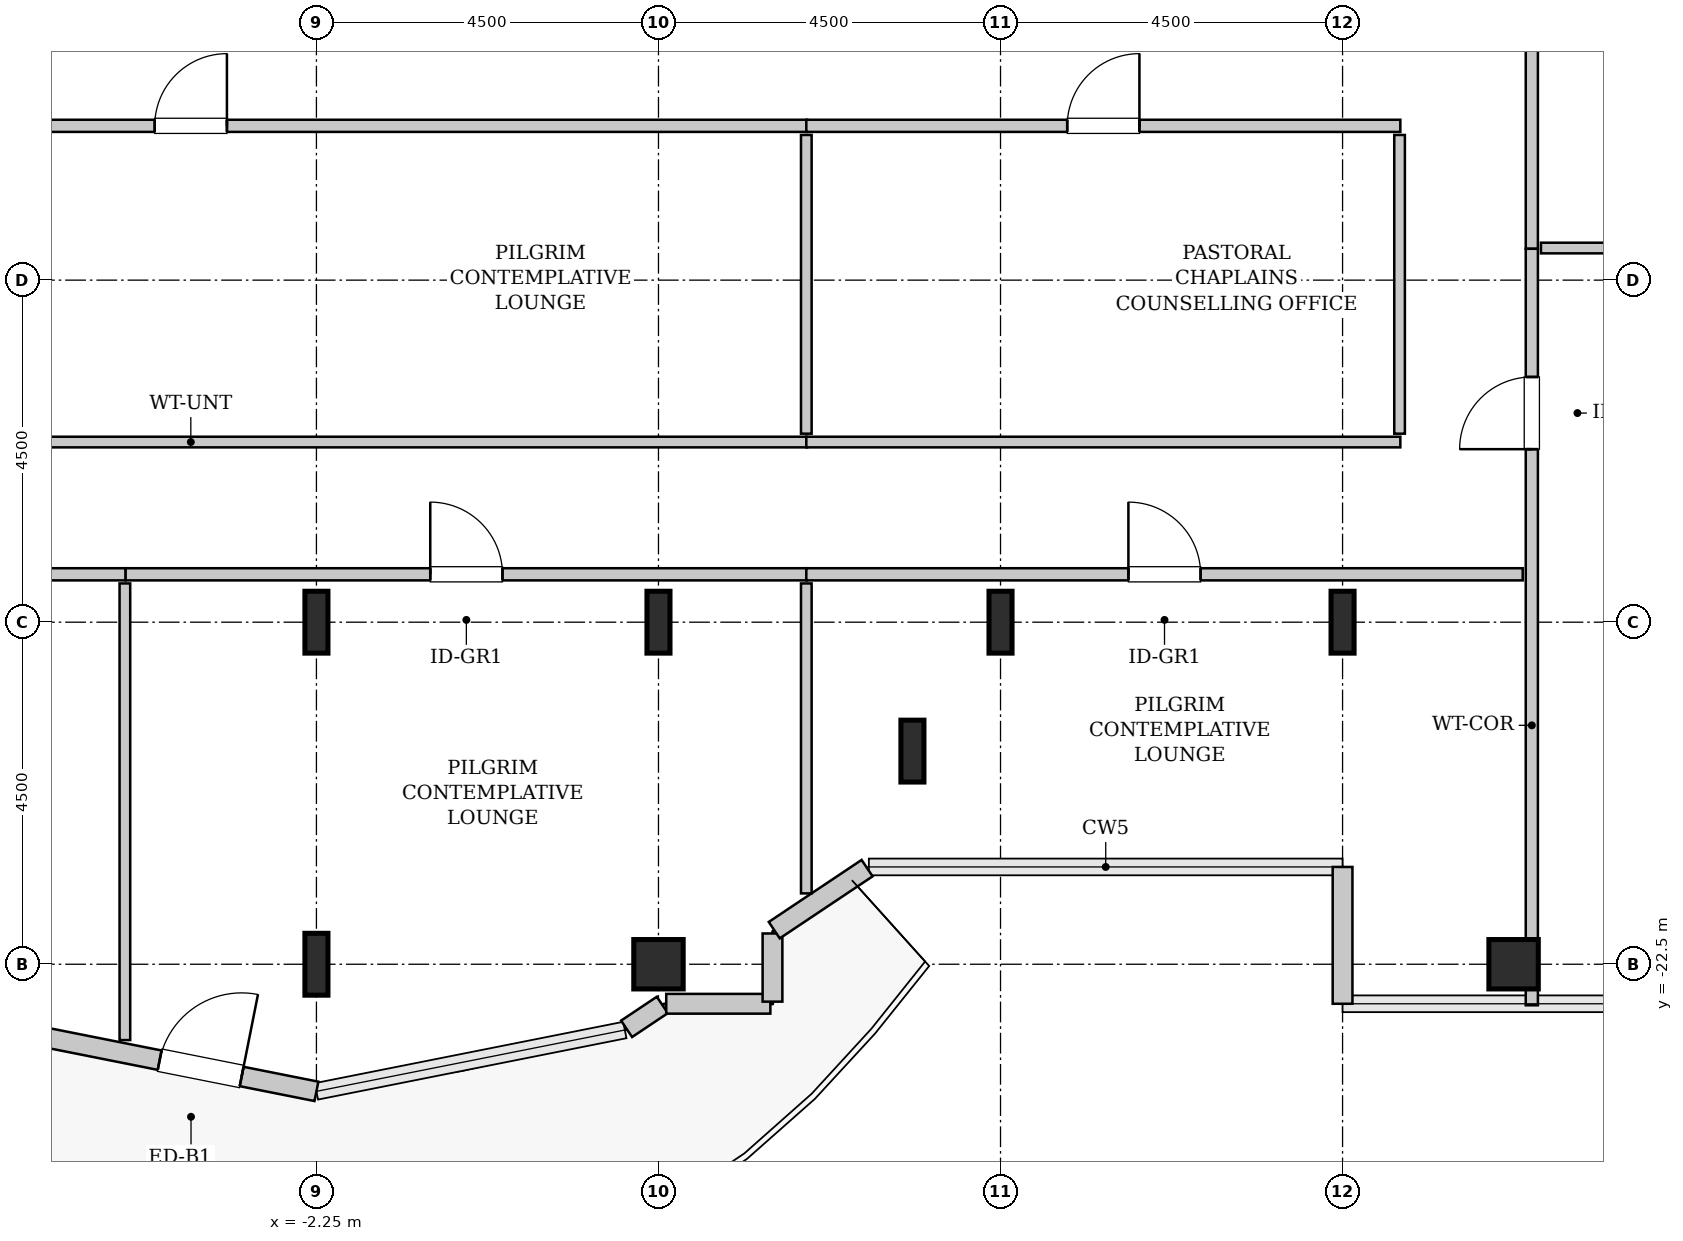
"""IFC4 building model, lengths in metres.
Left out: names, types, materials, properties, quantities, classifications, styles, units other than length and angle.
Written with IfcOpenShell. Run it as: python <this file> out.ifc"""

import sys

from ifc_helpers import new_model, si_unit, direction, frame, frame_2d, origin, origin_2d, place, context, subcontext, project, spatial, rectangle, hollow_rectangle, i_section, extrude, source, transform, mapped, element, fill, save


model = new_model("IFC4")
c1 = context("Model", 3, precision=1e-05, world=origin(), true_north=direction((0.0, 1.0)))
c2 = subcontext(c1, "Body", "Model", "MODEL_VIEW")
j1 = project(units=[si_unit("LENGTHUNIT", "METRE"), si_unit("PLANEANGLEUNIT", "RADIAN")], contexts=[c1])
p1 = place(None, origin())
s1 = spatial("IfcSite", under=j1, at=p1, CompositionType="ELEMENT")
p2 = place(p1, origin())
s2 = spatial("IfcBuilding", under=s1, at=p2, CompositionType="ELEMENT")
p3 = place(p2, frame((0.0, 0.0, 218.0)))
s3 = spatial("IfcBuildingStorey", under=s2, at=p3, CompositionType="ELEMENT", Elevation=218.0)
m1 = source(origin(), c2, "Body", "SweptSolid", [
    extrude(i_section(OverallWidth=0.303, OverallDepth=0.814, WebThickness=0.021, FlangeThickness=0.04, FilletRadius=0.03, at=origin_2d()), origin(), (0.0, 0.0, 1.0), 3.8),
])
for number, where, z_axis, x_axis in (
    (1, (-2.25, -22.5, 0.0), (0.0, 0.0, 1.0), (1.0, 0.0, 0.0)),
    (2, (-2.25, -18.0, 0.0), (0.0, 0.0, 1.0), (1.0, 0.0, 0.0)),
):
    element("IfcColumn", number, at=place(p3, frame(where, z_axis=z_axis, x_axis=x_axis)), inside=s3, PredefinedType="COLUMN", context=c2, shape_type="MappedRepresentation", body=[
        mapped(m1, transform((0.0, 0.0, 0.0), x_axis=(1.0, 0.0, 0.0), y_axis=(0.0, 1.0, 0.0), z_axis=(0.0, 0.0, 1.0), scale=1.0)),
    ])
m2 = source(origin(), c2, "Body", "SweptSolid", [
    extrude(hollow_rectangle(XDim=0.65, YDim=0.65, WallThickness=0.032, InnerFilletRadius=0.032, OuterFilletRadius=0.064, at=origin_2d()), origin(), (0.0, 0.0, 1.0), 3.8),
])
p4 = place(p3, frame((2.25, -22.5, 0.0), z_axis=(0.0, 0.0, 1.0), x_axis=(1.0, 0.0, 0.0)))
e3 = element("IfcColumn", 3, at=p4, inside=s3, PredefinedType="COLUMN", context=c2, shape_type="MappedRepresentation", body=[
    mapped(m2, transform((0.0, 0.0, 0.0), x_axis=(1.0, 0.0, 0.0), y_axis=(0.0, 1.0, 0.0), z_axis=(0.0, 0.0, 1.0), scale=1.0)),
])
for number, where, z_axis, x_axis in (
    (4, (2.25, -18.0, 0.0), (0.0, 0.0, 1.0), (1.0, 0.0, 0.0)),
    (5, (5.591, -19.696, 0.0), (0.0, 0.0, 1.0), (1.0, 0.0, 0.0)),
    (6, (6.75, -18.0, 0.0), (0.0, 0.0, 1.0), (1.0, 0.0, 0.0)),
    (7, (11.25, -18.0, 0.0), (0.0, 0.0, 1.0), (1.0, 0.0, 0.0)),
):
    element("IfcColumn", number, at=place(p3, frame(where, z_axis=z_axis, x_axis=x_axis)), inside=s3, PredefinedType="COLUMN", context=c2, shape_type="MappedRepresentation", body=[
        mapped(m1, transform((0.0, 0.0, 0.0), x_axis=(1.0, 0.0, 0.0), y_axis=(0.0, 1.0, 0.0), z_axis=(0.0, 0.0, 1.0), scale=1.0)),
    ])
p5 = place(p3, frame((13.5, -22.5, 0.0), z_axis=(0.0, 0.0, 1.0), x_axis=(1.0, 0.0, 0.0)))
e8 = element("IfcColumn", 8, at=p5, inside=s3, PredefinedType="COLUMN", context=c2, shape_type="MappedRepresentation", body=[
    mapped(m2, transform((0.0, 0.0, 0.0), x_axis=(1.0, 0.0, 0.0), y_axis=(0.0, 1.0, 0.0), z_axis=(0.0, 0.0, 1.0), scale=1.0)),
])
m3 = source(origin(), c2, "Body", "SweptSolid", [
    extrude(rectangle(XDim=1.8, YDim=0.26, at=frame_2d((0.9, 0.0))), origin(), (0.0, 0.0, 1.0), 3.55),
])
p6 = place(p3, frame((11.25, -21.22, 0.0), z_axis=(0.0, 0.0, 1.0), x_axis=(0.0, -1.0, 0.0)))
e9 = element("IfcWall", 9, at=p6, inside=s3, PredefinedType="SOLIDWALL", context=c2, shape_type="MappedRepresentation", body=[
    mapped(m3, transform((0.0, 0.0, 0.0), x_axis=(1.0, 0.0, 0.0), y_axis=(0.0, 1.0, 0.0), z_axis=(0.0, 0.0, 1.0), scale=1.0)),
])
m4 = source(origin(), c2, "Body", "SweptSolid", [
    extrude(rectangle(XDim=4.137, YDim=0.26, at=frame_2d((2.068, 0.0))), origin(), (0.0, 0.0, 1.0), 3.55),
])
p7 = place(p3, frame((-6.307, -23.365, 0.0), z_axis=(0.0, 0.0, 1.0), x_axis=(0.980782170794, -0.195105954428, 0.0)))
e10 = element("IfcWall", 10, at=p7, inside=s3, PredefinedType="SOLIDWALL", context=c2, shape_type="MappedRepresentation", body=[
    mapped(m4, transform((0.0, 0.0, 0.0), x_axis=(1.0, 0.0, 0.0), y_axis=(0.0, 1.0, 0.0), z_axis=(0.0, 0.0, 1.0), scale=1.0)),
])
p8 = place(p7, frame((2.034, 0.0, 0.0)))
e11 = element("IfcOpeningElement", 11, at=p8, cuts=e10, PredefinedType="OPENING", context=c2, shape_type="SweptSolid", body=[
    extrude(rectangle(XDim=1.1, YDim=2.2, at=frame_2d((0.55, 1.1))), frame((0.0, 0.14, 0.0), z_axis=(0.0, -1.0, 0.0), x_axis=(1.0, 0.0, 0.0)), (0.0, 0.0, 1.0), 0.28),
])
m5 = source(origin(), c2, "Body", "SweptSolid", [
    extrude(rectangle(XDim=0.565, YDim=0.26, at=frame_2d((0.283, 0.0))), origin(), (0.0, 0.0, 1.0), 3.55),
])
p9 = place(p3, frame((1.831, -23.35, 0.0), z_axis=(0.0, 0.0, 1.0), x_axis=(0.831651492666, 0.555297933317, 0.0)))
e12 = element("IfcWall", 12, at=p9, inside=s3, PredefinedType="SOLIDWALL", context=c2, shape_type="MappedRepresentation", body=[
    mapped(m5, transform((0.0, 0.0, 0.0), x_axis=(1.0, 0.0, 0.0), y_axis=(0.0, 1.0, 0.0), z_axis=(0.0, 0.0, 1.0), scale=1.0)),
])
m6 = source(origin(), c2, "Body", "SweptSolid", [
    extrude(rectangle(XDim=1.37, YDim=0.26, at=frame_2d((0.685, 0.0))), origin(), (0.0, 0.0, 1.0), 3.55),
])
p10 = place(p3, frame((2.352, -23.02, 0.0), z_axis=(0.0, 0.0, 1.0), x_axis=(1.0, 0.0, 0.0)))
e13 = element("IfcWall", 13, at=p10, inside=s3, PredefinedType="SOLIDWALL", context=c2, shape_type="MappedRepresentation", body=[
    mapped(m6, transform((0.0, 0.0, 0.0), x_axis=(1.0, 0.0, 0.0), y_axis=(0.0, 1.0, 0.0), z_axis=(0.0, 0.0, 1.0), scale=1.0)),
])
m7 = source(origin(), c2, "Body", "SweptSolid", [
    extrude(rectangle(XDim=0.897, YDim=0.26, at=frame_2d((0.448, 0.0))), origin(), (0.0, 0.0, 1.0), 3.55),
])
p11 = place(p3, frame((3.75, -22.992, 0.0), z_axis=(0.0, 0.0, 1.0), x_axis=(0.0, 1.0, 0.0)))
e14 = element("IfcWall", 14, at=p11, inside=s3, PredefinedType="SOLIDWALL", context=c2, shape_type="MappedRepresentation", body=[
    mapped(m7, transform((0.0, 0.0, 0.0), x_axis=(1.0, 0.0, 0.0), y_axis=(0.0, 1.0, 0.0), z_axis=(0.0, 0.0, 1.0), scale=1.0)),
])
m8 = source(origin(), c2, "Body", "SweptSolid", [
    extrude(rectangle(XDim=1.469, YDim=0.26, at=frame_2d((0.734, 0.0))), origin(), (0.0, 0.0, 1.0), 3.55),
])
p12 = place(p3, frame((3.773, -22.052, 0.0), z_axis=(0.0, 0.0, 1.0), x_axis=(0.831461760506, 0.555581983884, 0.0)))
e15 = element("IfcWall", 15, at=p12, inside=s3, PredefinedType="SOLIDWALL", context=c2, shape_type="MappedRepresentation", body=[
    mapped(m8, transform((0.0, 0.0, 0.0), x_axis=(1.0, 0.0, 0.0), y_axis=(0.0, 1.0, 0.0), z_axis=(0.0, 0.0, 1.0), scale=1.0)),
])
m9 = source(origin(), c2, "Body", "SweptSolid", [
    extrude(rectangle(XDim=9.892, YDim=0.16, at=frame_2d((4.946, 0.0))), origin(), (0.0, 0.0, 1.0), 3.535),
])
p13 = place(p3, frame((13.74, -13.087, 0.0), z_axis=(0.0, 0.0, 1.0), x_axis=(0.0, 1.0, 0.0)))
e16 = element("IfcWall", 16, at=p13, inside=s3, PredefinedType="PARTITIONING", context=c2, shape_type="MappedRepresentation", body=[
    mapped(m9, transform((0.0, 0.0, 0.0), x_axis=(1.0, 0.0, 0.0), y_axis=(0.0, 1.0, 0.0), z_axis=(0.0, 0.0, 1.0), scale=1.0)),
])
p14 = place(p13, frame((4.471, 0.0, 0.0)))
e17 = element("IfcOpeningElement", 17, at=p14, cuts=e16, PredefinedType="OPENING", context=c2, shape_type="SweptSolid", body=[
    extrude(rectangle(XDim=0.95, YDim=2.1, at=frame_2d((0.475, 1.05))), frame((0.0, 0.09, 0.0), z_axis=(0.0, -1.0, 0.0), x_axis=(1.0, 0.0, 0.0)), (0.0, 0.0, 1.0), 0.18),
])
m10 = source(origin(), c2, "Body", "SweptSolid", [
    extrude(rectangle(XDim=11.43, YDim=0.14, at=frame_2d((5.715, 0.0))), origin(), (0.0, 0.0, 1.0), 2.925),
])
p15 = place(p3, frame((13.86, -13.077, 0.0), z_axis=(0.0, 0.0, 1.0), x_axis=(1.0, 0.0, 0.0)))
e18 = element("IfcWall", 18, at=p15, inside=s3, PredefinedType="PARTITIONING", context=c2, shape_type="MappedRepresentation", body=[
    mapped(m10, transform((0.0, 0.0, 0.0), x_axis=(1.0, 0.0, 0.0), y_axis=(0.0, 1.0, 0.0), z_axis=(0.0, 0.0, 1.0), scale=1.0)),
])
m11 = source(origin(), c2, "Body", "SweptSolid", [
    extrude(rectangle(XDim=9.953, YDim=0.16, at=frame_2d((4.976, 0.0))), origin(), (0.0, 0.0, 1.0), 3.535),
])
p16 = place(p3, frame((13.74, -23.04, 0.0), z_axis=(0.0, 0.0, 1.0), x_axis=(0.0, 1.0, 0.0)))
e19 = element("IfcWall", 19, at=p16, inside=s3, PredefinedType="PARTITIONING", context=c2, shape_type="MappedRepresentation", body=[
    mapped(m11, transform((0.0, 0.0, 0.0), x_axis=(1.0, 0.0, 0.0), y_axis=(0.0, 1.0, 0.0), z_axis=(0.0, 0.0, 1.0), scale=1.0)),
])
p17 = place(p16, frame((7.316, 0.0, 0.0)))
e20 = element("IfcOpeningElement", 20, at=p17, cuts=e19, PredefinedType="OPENING", context=c2, shape_type="SweptSolid", body=[
    extrude(rectangle(XDim=0.95, YDim=2.1, at=frame_2d((0.475, 1.05))), frame((0.0, 0.09, 0.0), z_axis=(0.0, -1.0, 0.0), x_axis=(1.0, 0.0, 0.0)), (0.0, 0.0, 1.0), 0.18),
])
m12 = source(origin(), c2, "Body", "SweptSolid", [
    extrude(rectangle(XDim=8.86, YDim=0.16, at=frame_2d((4.43, 0.0))), origin(), (0.0, 0.0, 1.0), 3.535),
])
p18 = place(p3, frame((-13.62, -17.37, 0.0), z_axis=(0.0, 0.0, 1.0), x_axis=(1.0, 0.0, 0.0)))
e21 = element("IfcWall", 21, at=p18, inside=s3, PredefinedType="PARTITIONING", context=c2, shape_type="MappedRepresentation", body=[
    mapped(m12, transform((0.0, 0.0, 0.0), x_axis=(1.0, 0.0, 0.0), y_axis=(0.0, 1.0, 0.0), z_axis=(0.0, 0.0, 1.0), scale=1.0)),
])
p19 = place(p18, frame((3.955, 0.0, 0.0)))
e22 = element("IfcOpeningElement", 22, at=p19, cuts=e21, PredefinedType="OPENING", context=c2, shape_type="SweptSolid", body=[
    extrude(rectangle(XDim=0.95, YDim=2.1, at=frame_2d((0.475, 1.05))), frame((0.0, 0.09, 0.0), z_axis=(0.0, -1.0, 0.0), x_axis=(1.0, 0.0, 0.0)), (0.0, 0.0, 1.0), 0.18),
])
m13 = source(origin(), c2, "Body", "SweptSolid", [
    extrude(rectangle(XDim=6.008, YDim=0.14, at=frame_2d((3.004, 0.0))), origin(), (0.0, 0.0, 1.0), 3.535),
])
p20 = place(p3, frame((-4.77, -23.498, 0.0), z_axis=(0.0, 0.0, 1.0), x_axis=(0.0, 1.0, 0.0)))
e23 = element("IfcWall", 23, at=p20, inside=s3, PredefinedType="PARTITIONING", context=c2, shape_type="MappedRepresentation", body=[
    mapped(m13, transform((0.0, 0.0, 0.0), x_axis=(1.0, 0.0, 0.0), y_axis=(0.0, 1.0, 0.0), z_axis=(0.0, 0.0, 1.0), scale=1.0)),
])
m14 = source(origin(), c2, "Body", "SweptSolid", [
    extrude(rectangle(XDim=8.965, YDim=0.16, at=frame_2d((4.482, 0.0))), origin(), (0.0, 0.0, 1.0), 3.535),
])
p21 = place(p3, frame((-4.76, -17.37, 0.0), z_axis=(0.0, 0.0, 1.0), x_axis=(1.0, 0.0, 0.0)))
e24 = element("IfcWall", 24, at=p21, inside=s3, PredefinedType="PARTITIONING", context=c2, shape_type="MappedRepresentation", body=[
    mapped(m14, transform((0.0, 0.0, 0.0), x_axis=(1.0, 0.0, 0.0), y_axis=(0.0, 1.0, 0.0), z_axis=(0.0, 0.0, 1.0), scale=1.0)),
])
p22 = place(p21, frame((4.008, 0.0, 0.0)))
e25 = element("IfcOpeningElement", 25, at=p22, cuts=e24, PredefinedType="OPENING", context=c2, shape_type="SweptSolid", body=[
    extrude(rectangle(XDim=0.95, YDim=2.1, at=frame_2d((0.475, 1.05))), frame((0.0, 0.09, 0.0), z_axis=(0.0, -1.0, 0.0), x_axis=(1.0, 0.0, 0.0)), (0.0, 0.0, 1.0), 0.18),
])
m15 = source(origin(), c2, "Body", "SweptSolid", [
    extrude(rectangle(XDim=4.078, YDim=0.14, at=frame_2d((2.039, 0.0))), origin(), (0.0, 0.0, 1.0), 3.535),
])
p23 = place(p3, frame((4.195, -21.568, 0.0), z_axis=(0.0, 0.0, 1.0), x_axis=(0.0, 1.0, 0.0)))
e26 = element("IfcWall", 26, at=p23, inside=s3, PredefinedType="PARTITIONING", context=c2, shape_type="MappedRepresentation", body=[
    mapped(m15, transform((0.0, 0.0, 0.0), x_axis=(1.0, 0.0, 0.0), y_axis=(0.0, 1.0, 0.0), z_axis=(0.0, 0.0, 1.0), scale=1.0)),
])
m16 = source(origin(), c2, "Body", "SweptSolid", [
    extrude(rectangle(XDim=16.215, YDim=0.16, at=frame_2d((8.107, 0.0))), origin(), (0.0, 0.0, 1.0), 3.535),
])
p24 = place(p3, frame((-12.01, -11.47, 0.0), z_axis=(0.0, 0.0, 1.0), x_axis=(1.0, 0.0, 0.0)))
e27 = element("IfcWall", 27, at=p24, inside=s3, PredefinedType="PARTITIONING", context=c2, shape_type="MappedRepresentation", body=[
    mapped(m16, transform((0.0, 0.0, 0.0), x_axis=(1.0, 0.0, 0.0), y_axis=(0.0, 1.0, 0.0), z_axis=(0.0, 0.0, 1.0), scale=1.0)),
])
p25 = place(p24, frame((7.633, 0.0, 0.0)))
e28 = element("IfcOpeningElement", 28, at=p25, cuts=e27, PredefinedType="OPENING", context=c2, shape_type="SweptSolid", body=[
    extrude(rectangle(XDim=0.95, YDim=2.1, at=frame_2d((0.475, 1.05))), frame((0.0, 0.09, 0.0), z_axis=(0.0, -1.0, 0.0), x_axis=(1.0, 0.0, 0.0)), (0.0, 0.0, 1.0), 0.18),
])
m17 = source(origin(), c2, "Body", "SweptSolid", [
    extrude(rectangle(XDim=16.215, YDim=0.14, at=frame_2d((8.107, 0.0))), origin(), (0.0, 0.0, 1.0), 3.535),
])
p26 = place(p3, frame((-12.01, -15.63, 0.0), z_axis=(0.0, 0.0, 1.0), x_axis=(1.0, 0.0, 0.0)))
e29 = element("IfcWall", 29, at=p26, inside=s3, PredefinedType="PARTITIONING", context=c2, shape_type="MappedRepresentation", body=[
    mapped(m17, transform((0.0, 0.0, 0.0), x_axis=(1.0, 0.0, 0.0), y_axis=(0.0, 1.0, 0.0), z_axis=(0.0, 0.0, 1.0), scale=1.0)),
])
m18 = source(origin(), c2, "Body", "SweptSolid", [
    extrude(rectangle(XDim=3.93, YDim=0.14, at=frame_2d((1.965, 0.0))), origin(), (0.0, 0.0, 1.0), 3.535),
])
p27 = place(p3, frame((4.195, -15.52, 0.0), z_axis=(0.0, 0.0, 1.0), x_axis=(0.0, 1.0, 0.0)))
e30 = element("IfcWall", 30, at=p27, inside=s3, PredefinedType="PARTITIONING", context=c2, shape_type="MappedRepresentation", body=[
    mapped(m18, transform((0.0, 0.0, 0.0), x_axis=(1.0, 0.0, 0.0), y_axis=(0.0, 1.0, 0.0), z_axis=(0.0, 0.0, 1.0), scale=1.0)),
])
m19 = source(origin(), c2, "Body", "SweptSolid", [
    extrude(rectangle(XDim=9.425, YDim=0.16, at=frame_2d((4.712, 0.0))), origin(), (0.0, 0.0, 1.0), 3.535),
])
p28 = place(p3, frame((4.195, -17.37, 0.0), z_axis=(0.0, 0.0, 1.0), x_axis=(1.0, 0.0, 0.0)))
e31 = element("IfcWall", 31, at=p28, inside=s3, PredefinedType="PARTITIONING", context=c2, shape_type="MappedRepresentation", body=[
    mapped(m19, transform((0.0, 0.0, 0.0), x_axis=(1.0, 0.0, 0.0), y_axis=(0.0, 1.0, 0.0), z_axis=(0.0, 0.0, 1.0), scale=1.0)),
])
p29 = place(p28, frame((4.238, 0.0, 0.0)))
e32 = element("IfcOpeningElement", 32, at=p29, cuts=e31, PredefinedType="OPENING", context=c2, shape_type="SweptSolid", body=[
    extrude(rectangle(XDim=0.95, YDim=2.1, at=frame_2d((0.475, 1.05))), frame((0.0, 0.09, 0.0), z_axis=(0.0, -1.0, 0.0), x_axis=(1.0, 0.0, 0.0)), (0.0, 0.0, 1.0), 0.18),
])
m20 = source(origin(), c2, "Body", "SweptSolid", [
    extrude(rectangle(XDim=7.815, YDim=0.16, at=frame_2d((3.907, 0.0))), origin(), (0.0, 0.0, 1.0), 3.535),
])
p30 = place(p3, frame((4.195, -11.47, 0.0), z_axis=(0.0, 0.0, 1.0), x_axis=(1.0, 0.0, 0.0)))
e33 = element("IfcWall", 33, at=p30, inside=s3, PredefinedType="PARTITIONING", context=c2, shape_type="MappedRepresentation", body=[
    mapped(m20, transform((0.0, 0.0, 0.0), x_axis=(1.0, 0.0, 0.0), y_axis=(0.0, 1.0, 0.0), z_axis=(0.0, 0.0, 1.0), scale=1.0)),
])
p31 = place(p30, frame((3.433, 0.0, 0.0)))
e34 = element("IfcOpeningElement", 34, at=p31, cuts=e33, PredefinedType="OPENING", context=c2, shape_type="SweptSolid", body=[
    extrude(rectangle(XDim=0.95, YDim=2.1, at=frame_2d((0.475, 1.05))), frame((0.0, 0.09, 0.0), z_axis=(0.0, -1.0, 0.0), x_axis=(1.0, 0.0, 0.0)), (0.0, 0.0, 1.0), 0.18),
])
m21 = source(origin(), c2, "Body", "SweptSolid", [
    extrude(rectangle(XDim=7.815, YDim=0.14, at=frame_2d((3.907, 0.0))), origin(), (0.0, 0.0, 1.0), 3.535),
])
p32 = place(p3, frame((4.195, -15.63, 0.0), z_axis=(0.0, 0.0, 1.0), x_axis=(1.0, 0.0, 0.0)))
e35 = element("IfcWall", 35, at=p32, inside=s3, PredefinedType="PARTITIONING", context=c2, shape_type="MappedRepresentation", body=[
    mapped(m21, transform((0.0, 0.0, 0.0), x_axis=(1.0, 0.0, 0.0), y_axis=(0.0, 1.0, 0.0), z_axis=(0.0, 0.0, 1.0), scale=1.0)),
])
p33 = place(p3, frame((12.0, -15.52, 0.0), z_axis=(0.0, 0.0, 1.0), x_axis=(0.0, 1.0, 0.0)))
e36 = element("IfcWall", 36, at=p33, inside=s3, PredefinedType="PARTITIONING", context=c2, shape_type="MappedRepresentation", body=[
    mapped(m18, transform((0.0, 0.0, 0.0), x_axis=(1.0, 0.0, 0.0), y_axis=(0.0, 1.0, 0.0), z_axis=(0.0, 0.0, 1.0), scale=1.0)),
])
m22 = source(origin(), c2, "Body", "SweptSolid", [
    extrude(rectangle(XDim=1.1, YDim=2.2, at=frame_2d((0.55, 1.1))), frame((0.0, 0.025, 0.0), z_axis=(0.0, -1.0, 0.0), x_axis=(1.0, 0.0, 0.0)), (0.0, 0.0, 1.0), 0.05),
])
p34 = place(p8, origin())
e37 = element("IfcDoor", 37, at=p34, inside=s3, OperationType="SINGLE_SWING_RIGHT", PredefinedType="DOOR", context=c2, shape_type="MappedRepresentation", body=[
    mapped(m22, transform((0.0, 0.0, 0.0), x_axis=(1.0, 0.0, 0.0), y_axis=(0.0, 1.0, 0.0), z_axis=(0.0, 0.0, 1.0), scale=1.0)),
])
fill(e11, e37)
m23 = source(origin(), c2, "Body", "SweptSolid", [
    extrude(rectangle(XDim=0.95, YDim=2.1, at=frame_2d((0.475, 1.05))), frame((0.0, 0.025, 0.0), z_axis=(0.0, -1.0, 0.0), x_axis=(1.0, 0.0, 0.0)), (0.0, 0.0, 1.0), 0.05),
])
p35 = place(p17, origin())
e38 = element("IfcDoor", 38, at=p35, inside=s3, OperationType="SINGLE_SWING_LEFT", PredefinedType="DOOR", context=c2, shape_type="MappedRepresentation", body=[
    mapped(m23, transform((0.0, 0.0, 0.0), x_axis=(1.0, 0.0, 0.0), y_axis=(0.0, 1.0, 0.0), z_axis=(0.0, 0.0, 1.0), scale=1.0)),
])
fill(e20, e38)
p36 = place(p22, origin())
e39 = element("IfcDoor", 39, at=p36, inside=s3, OperationType="SINGLE_SWING_LEFT", PredefinedType="DOOR", context=c2, shape_type="MappedRepresentation", body=[
    mapped(m23, transform((0.0, 0.0, 0.0), x_axis=(1.0, 0.0, 0.0), y_axis=(0.0, 1.0, 0.0), z_axis=(0.0, 0.0, 1.0), scale=1.0)),
])
fill(e25, e39)
p37 = place(p25, origin())
e40 = element("IfcDoor", 40, at=p37, inside=s3, OperationType="SINGLE_SWING_RIGHT", PredefinedType="DOOR", context=c2, shape_type="MappedRepresentation", body=[
    mapped(m23, transform((0.0, 0.0, 0.0), x_axis=(1.0, 0.0, 0.0), y_axis=(0.0, 1.0, 0.0), z_axis=(0.0, 0.0, 1.0), scale=1.0)),
])
fill(e28, e40)
p38 = place(p29, origin())
e41 = element("IfcDoor", 41, at=p38, inside=s3, OperationType="SINGLE_SWING_LEFT", PredefinedType="DOOR", context=c2, shape_type="MappedRepresentation", body=[
    mapped(m23, transform((0.0, 0.0, 0.0), x_axis=(1.0, 0.0, 0.0), y_axis=(0.0, 1.0, 0.0), z_axis=(0.0, 0.0, 1.0), scale=1.0)),
])
fill(e32, e41)
p39 = place(p31, origin())
e42 = element("IfcDoor", 42, at=p39, inside=s3, OperationType="SINGLE_SWING_RIGHT", PredefinedType="DOOR", context=c2, shape_type="MappedRepresentation", body=[
    mapped(m23, transform((0.0, 0.0, 0.0), x_axis=(1.0, 0.0, 0.0), y_axis=(0.0, 1.0, 0.0), z_axis=(0.0, 0.0, 1.0), scale=1.0)),
])
fill(e34, e42)
save(model, sys.argv[1])
